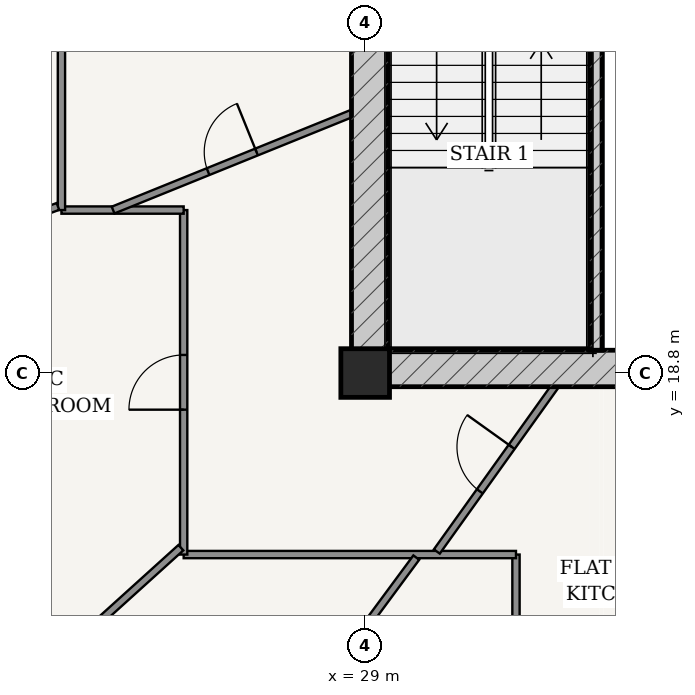
"""IFC4 building model, lengths in metres.
Left out: names, types, materials, properties, quantities, classifications, styles, units other than length and angle.
Written with IfcOpenShell. Run it as: python <this file> out.ifc"""

import sys

from ifc_helpers import new_model, si_unit, direction, frame, frame_2d, origin, origin_2d, place, context, subcontext, project, spatial, rectangle, extrude, source, transform, mapped, element, fill, save


model = new_model("IFC4")
c1 = context("Model", 3, precision=1e-05, world=origin(), true_north=direction((-0.2419218956, 0.970295726276)))
c2 = subcontext(c1, "Body", "Model", "MODEL_VIEW")
j1 = project(units=[si_unit("LENGTHUNIT", "METRE"), si_unit("PLANEANGLEUNIT", "RADIAN")], contexts=[c1])
p1 = place(None, origin())
s1 = spatial("IfcSite", under=j1, at=p1, CompositionType="ELEMENT")
p2 = place(p1, origin())
s2 = spatial("IfcBuilding", under=s1, at=p2, CompositionType="ELEMENT")
p3 = place(p2, frame((0.0, 0.0, 213.4)))
s3 = spatial("IfcBuildingStorey", under=s2, at=p3, CompositionType="ELEMENT", Elevation=213.4)
p4 = place(p3, frame((29.0, 18.8, 0.0), z_axis=(0.0, 0.0, 1.0), x_axis=(1.0, 0.0, 0.0)))
e1 = element("IfcColumn", 1, at=p4, inside=s3, PredefinedType="COLUMN", context=c2, shape_type="SweptSolid", body=[
    extrude(rectangle(XDim=0.8, YDim=0.8, at=origin_2d()), origin(), (0.0, 0.0, 1.0), 3.7),
])
p5 = place(p3, frame((28.775, 18.875, 0.0), z_axis=(0.0, 0.0, 1.0), x_axis=(1.0, 0.0, 0.0)))
e2 = element("IfcWall", 2, at=p5, inside=s3, PredefinedType="SHEAR", context=c2, shape_type="SweptSolid", body=[
    extrude(rectangle(XDim=18.45, YDim=0.6, at=frame_2d((9.225, 0.0))), origin(), (0.0, 0.0, 1.0), 3.435),
])
p6 = place(p5, frame((7.46, 0.0, 0.0)))
e3 = element("IfcOpeningElement", 3, at=p6, cuts=e2, PredefinedType="OPENING", context=c2, shape_type="SweptSolid", body=[
    extrude(rectangle(XDim=0.85, YDim=2.1, at=frame_2d((0.425, 1.05))), frame((0.0, 0.31, 0.0), z_axis=(0.0, -1.0, 0.0), x_axis=(1.0, 0.0, 0.0)), (0.0, 0.0, 1.0), 0.62),
])
p7 = place(p5, frame((10.54, 0.0, 0.0)))
e4 = element("IfcOpeningElement", 4, at=p7, cuts=e2, PredefinedType="OPENING", context=c2, shape_type="SweptSolid", body=[
    extrude(rectangle(XDim=0.85, YDim=2.1, at=frame_2d((0.425, 1.05))), frame((0.0, 0.31, 0.0), z_axis=(0.0, -1.0, 0.0), x_axis=(1.0, 0.0, 0.0)), (0.0, 0.0, 1.0), 0.62),
])
p8 = place(p3, frame((29.075, 19.175, 0.0), z_axis=(0.0, 0.0, 1.0), x_axis=(0.0, 1.0, 0.0)))
e5 = element("IfcWall", 5, at=p8, inside=s3, PredefinedType="SHEAR", context=c2, shape_type="SweptSolid", body=[
    extrude(rectangle(XDim=15.25, YDim=0.6, at=frame_2d((7.625, 0.0))), origin(), (0.0, 0.0, 1.0), 3.435),
])
p9 = place(p8, frame((9.875, 0.0, 0.0)))
e6 = element("IfcOpeningElement", 6, at=p9, cuts=e5, PredefinedType="OPENING", context=c2, shape_type="SweptSolid", body=[
    extrude(rectangle(XDim=1.5, YDim=2.2, at=frame_2d((0.75, 1.1))), frame((0.0, 0.31, 0.0), z_axis=(0.0, -1.0, 0.0), x_axis=(1.0, 0.0, 0.0)), (0.0, 0.0, 1.0), 0.62),
])
p10 = place(p3, frame((32.795, 19.175, 0.0), z_axis=(0.0, 0.0, 1.0), x_axis=(0.0, 1.0, 0.0)))
e7 = element("IfcWall", 7, at=p10, inside=s3, PredefinedType="SOLIDWALL", context=c2, shape_type="SweptSolid", body=[
    extrude(rectangle(XDim=7.375, YDim=0.2, at=frame_2d((3.688, 0.0))), origin(), (0.0, 0.0, 1.0), 3.435),
])
p11 = place(p3, frame((31.48, 13.805, 0.0), z_axis=(0.0, 0.0, 1.0), x_axis=(0.0, 1.0, 0.0)))
e8 = element("IfcWall", 8, at=p11, inside=s3, PredefinedType="PARTITIONING", context=c2, shape_type="SweptSolid", body=[
    extrude(rectangle(XDim=2.01, YDim=0.12, at=frame_2d((1.005, 0.0))), origin(), (0.0, 0.0, 1.0), 3.11),
])
p12 = place(p3, frame((31.48, 15.815, 0.0), z_axis=(0.0, 0.0, 1.0), x_axis=(-1.0, 0.0, 0.0)))
e9 = element("IfcWall", 9, at=p12, inside=s3, PredefinedType="PARTITIONING", context=c2, shape_type="SweptSolid", body=[
    extrude(rectangle(XDim=5.465, YDim=0.12, at=frame_2d((2.732, 0.0))), origin(), (0.0, 0.0, 1.0), 2.951),
])
p13 = place(p3, frame((26.015, 15.815, 0.0), z_axis=(0.0, 0.0, 1.0), x_axis=(0.0, 1.0, 0.0)))
e10 = element("IfcWall", 10, at=p13, inside=s3, PredefinedType="PARTITIONING", context=c2, shape_type="SweptSolid", body=[
    extrude(rectangle(XDim=5.665, YDim=0.12, at=frame_2d((2.833, 0.0))), origin(), (0.0, 0.0, 1.0), 2.951),
])
p14 = place(p13, frame((2.383, 0.0, 0.0)))
e11 = element("IfcOpeningElement", 11, at=p14, cuts=e10, PredefinedType="OPENING", context=c2, shape_type="SweptSolid", body=[
    extrude(rectangle(XDim=0.9, YDim=2.15, at=frame_2d((0.45, 1.075))), frame((0.0, 0.07, 0.0), z_axis=(0.0, -1.0, 0.0), x_axis=(1.0, 0.0, 0.0)), (0.0, 0.0, 1.0), 0.14),
])
p15 = place(p3, frame((26.015, 21.48, 0.0), z_axis=(0.0, 0.0, 1.0), x_axis=(-1.0, 0.0, 0.0)))
e12 = element("IfcWall", 12, at=p15, inside=s3, PredefinedType="PARTITIONING", context=c2, shape_type="SweptSolid", body=[
    extrude(rectangle(XDim=2.01, YDim=0.12, at=frame_2d((1.005, 0.0))), origin(), (0.0, 0.0, 1.0), 3.11),
])
p16 = place(p3, frame((24.005, 21.48, 0.0), z_axis=(0.0, 0.0, 1.0), x_axis=(0.0, 1.0, 0.0)))
e13 = element("IfcWall", 13, at=p16, inside=s3, PredefinedType="PARTITIONING", context=c2, shape_type="SweptSolid", body=[
    extrude(rectangle(XDim=5.218, YDim=0.12, at=frame_2d((2.609, 0.0))), origin(), (0.0, 0.0, 1.0), 2.951),
])
p17 = place(p3, frame((23.947, 21.54, 0.0), z_axis=(0.0, 0.0, 1.0), x_axis=(-0.936534700322, -0.350574892274, 0.0)))
e14 = element("IfcWall", 14, at=p17, inside=s3, PredefinedType="PARTITIONING", context=c2, shape_type="SweptSolid", body=[
    extrude(rectangle(XDim=6.439, YDim=0.12, at=frame_2d((3.219, 0.0))), origin(), (0.0, 0.0, 1.0), 2.951),
])
p18 = place(p17, frame((2.769, 0.0, 0.0)))
e15 = element("IfcOpeningElement", 15, at=p18, cuts=e14, PredefinedType="OPENING", context=c2, shape_type="SweptSolid", body=[
    extrude(rectangle(XDim=0.9, YDim=2.15, at=frame_2d((0.45, 1.075))), frame((0.0, 0.07, 0.0), z_axis=(0.0, -1.0, 0.0), x_axis=(1.0, 0.0, 0.0)), (0.0, 0.0, 1.0), 0.14),
])
p19 = place(p3, frame((25.969, 15.928, 0.0), z_axis=(0.0, 0.0, 1.0), x_axis=(-0.741935446671, -0.670471321514, 0.0)))
e16 = element("IfcWall", 16, at=p19, inside=s3, PredefinedType="PARTITIONING", context=c2, shape_type="SweptSolid", body=[
    extrude(rectangle(XDim=4.499, YDim=0.12, at=frame_2d((2.25, 0.0))), origin(), (0.0, 0.0, 1.0), 2.951),
])
p20 = place(p19, frame((1.8, 0.0, 0.0)))
e17 = element("IfcOpeningElement", 17, at=p20, cuts=e16, PredefinedType="OPENING", context=c2, shape_type="SweptSolid", body=[
    extrude(rectangle(XDim=0.9, YDim=2.15, at=frame_2d((0.45, 1.075))), frame((0.0, 0.07, 0.0), z_axis=(0.0, -1.0, 0.0), x_axis=(1.0, 0.0, 0.0)), (0.0, 0.0, 1.0), 0.14),
])
p21 = place(p3, frame((29.841, 15.765, 0.0), z_axis=(0.0, 0.0, 1.0), x_axis=(-0.594535821787, -0.804069124275, 0.0)))
e18 = element("IfcWall", 18, at=p21, inside=s3, PredefinedType="PARTITIONING", context=c2, shape_type="SweptSolid", body=[
    extrude(rectangle(XDim=6.543, YDim=0.12, at=frame_2d((3.272, 0.0))), origin(), (0.0, 0.0, 1.0), 2.951),
])
p22 = place(p21, frame((1.814, 0.0, 0.0)))
e19 = element("IfcOpeningElement", 19, at=p22, cuts=e18, PredefinedType="OPENING", context=c2, shape_type="SweptSolid", body=[
    extrude(rectangle(XDim=0.9, YDim=2.15, at=frame_2d((0.45, 1.075))), frame((0.0, 0.07, 0.0), z_axis=(0.0, -1.0, 0.0), x_axis=(1.0, 0.0, 0.0)), (0.0, 0.0, 1.0), 0.14),
])
p23 = place(p3, frame((28.775, 23.067, 0.0), z_axis=(0.0, 0.0, 1.0), x_axis=(-0.926976443277, -0.375119545757, 0.0)))
e20 = element("IfcWall", 20, at=p23, inside=s3, PredefinedType="PARTITIONING", context=c2, shape_type="SweptSolid", body=[
    extrude(rectangle(XDim=4.23, YDim=0.12, at=frame_2d((2.115, 0.0))), origin(), (0.0, 0.0, 1.0), 3.435),
])
p24 = place(p23, frame((1.685, 0.0, 0.0)))
e21 = element("IfcOpeningElement", 21, at=p24, cuts=e20, PredefinedType="OPENING", context=c2, shape_type="SweptSolid", body=[
    extrude(rectangle(XDim=0.86, YDim=2.15, at=frame_2d((0.43, 1.075))), frame((0.0, 0.07, 0.0), z_axis=(0.0, -1.0, 0.0), x_axis=(1.0, 0.0, 0.0)), (0.0, 0.0, 1.0), 0.14),
])
p25 = place(p3, frame((32.117, 18.575, 0.0), z_axis=(0.0, 0.0, 1.0), x_axis=(-0.581813438478, -0.813322274874, 0.0)))
e22 = element("IfcWall", 22, at=p25, inside=s3, PredefinedType="PARTITIONING", context=c2, shape_type="SweptSolid", body=[
    extrude(rectangle(XDim=3.331, YDim=0.12, at=frame_2d((1.666, 0.0))), origin(), (0.0, 0.0, 1.0), 3.435),
])
p26 = place(p25, frame((1.216, 0.0, 0.0)))
e23 = element("IfcOpeningElement", 23, at=p26, cuts=e22, PredefinedType="OPENING", context=c2, shape_type="SweptSolid", body=[
    extrude(rectangle(XDim=0.9, YDim=2.15, at=frame_2d((0.45, 1.075))), frame((0.0, 0.07, 0.0), z_axis=(0.0, -1.0, 0.0), x_axis=(1.0, 0.0, 0.0)), (0.0, 0.0, 1.0), 0.14),
])
m1 = source(origin(), c2, "Body", "SweptSolid", [
    extrude(rectangle(XDim=0.9, YDim=2.15, at=frame_2d((0.45, 1.075))), frame((0.0, 0.025, 0.0), z_axis=(0.0, -1.0, 0.0), x_axis=(1.0, 0.0, 0.0)), (0.0, 0.0, 1.0), 0.05),
])
p27 = place(p26, frame((0.9, 0.0, 0.0), z_axis=(0.0, 0.0, 1.0), x_axis=(-1.0, 0.0, 0.0)))
e24 = element("IfcDoor", 24, at=p27, inside=s3, OperationType="SINGLE_SWING_RIGHT", PredefinedType="DOOR", context=c2, shape_type="MappedRepresentation", body=[
    mapped(m1, transform((0.0, 0.0, 0.0), scale=1.0)),
])
fill(e23, e24)
p28 = place(p14, origin())
e25 = element("IfcDoor", 25, at=p28, inside=s3, OperationType="SINGLE_SWING_LEFT", PredefinedType="DOOR", context=c2, shape_type="MappedRepresentation", body=[
    mapped(m1, transform((0.0, 0.0, 0.0), scale=1.0)),
])
fill(e11, e25)
m2 = source(origin(), c2, "Body", "SweptSolid", [
    extrude(rectangle(XDim=0.86, YDim=2.15, at=frame_2d((0.43, 1.075))), frame((0.0, 0.025, 0.0), z_axis=(0.0, -1.0, 0.0), x_axis=(1.0, 0.0, 0.0)), (0.0, 0.0, 1.0), 0.05),
])
p29 = place(p24, frame((0.86, 0.0, 0.0), z_axis=(0.0, 0.0, 1.0), x_axis=(-1.0, 0.0, 0.0)))
e26 = element("IfcDoor", 26, at=p29, inside=s3, OperationType="SINGLE_SWING_RIGHT", PredefinedType="DOOR", context=c2, shape_type="MappedRepresentation", body=[
    mapped(m2, transform((0.0, 0.0, 0.0), scale=1.0)),
])
fill(e21, e26)
save(model, sys.argv[1])
